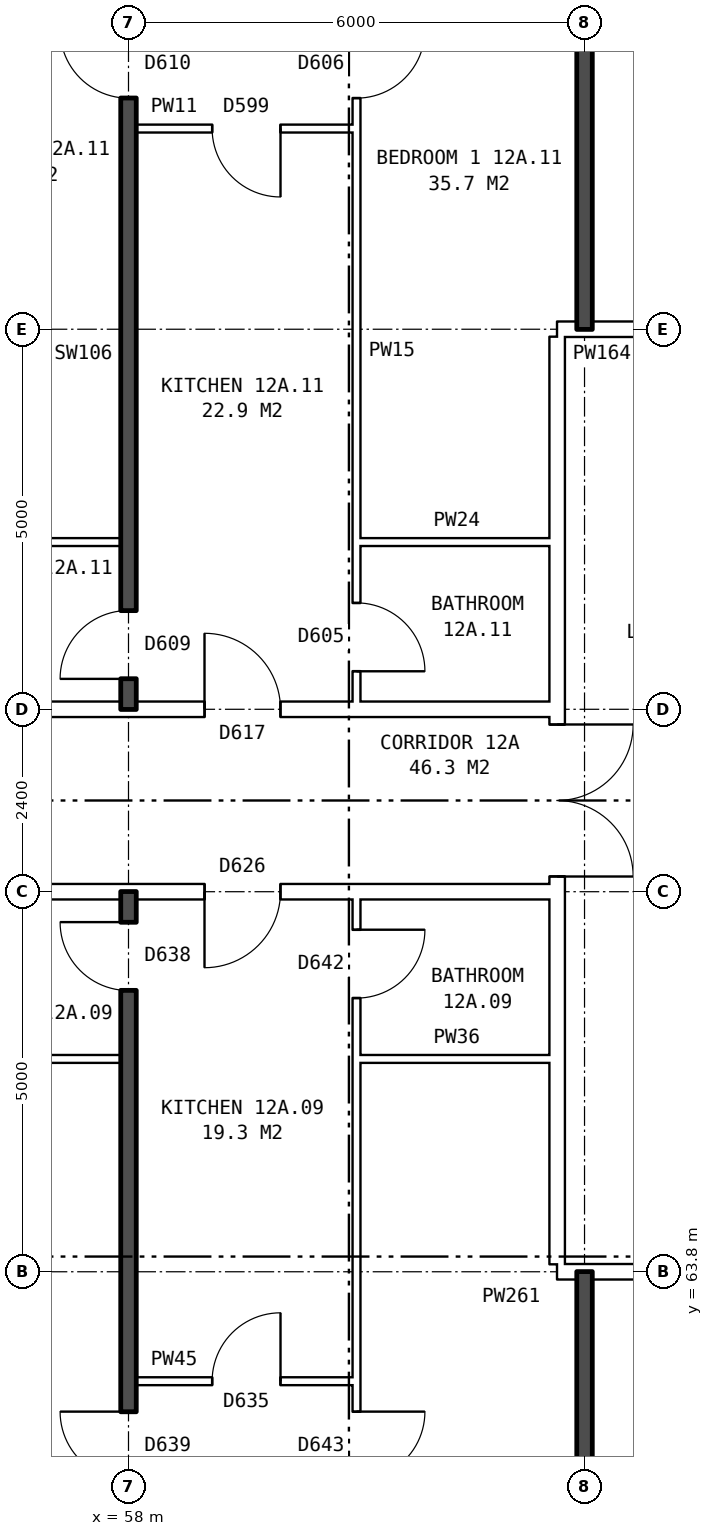
"""IFC4 building model, lengths in metres.
Left out: names, types, materials, properties, quantities, classifications, styles, units other than length and angle.
Written with IfcOpenShell. Run it as: python <this file> out.ifc"""

import sys

from ifc_helpers import new_model, si_unit, direction, frame, frame_2d, origin, place, context, subcontext, project, spatial, rectangle, extrude, element, fill, save


model = new_model("IFC4")
c1 = context("Model", 3, precision=1e-05, world=origin(), true_north=direction((0.0, 1.0)))
c2 = subcontext(c1, "Body", "Model", "MODEL_VIEW")
j1 = project(units=[si_unit("LENGTHUNIT", "METRE"), si_unit("PLANEANGLEUNIT", "RADIAN")], contexts=[c1])
p1 = place(None, origin())
s1 = spatial("IfcSite", under=j1, at=p1, CompositionType="ELEMENT")
p2 = place(p1, origin())
s2 = spatial("IfcBuilding", under=s1, at=p2, CompositionType="ELEMENT")
p3 = place(p2, frame((0.0, 0.0, 47.4)))
s3 = spatial("IfcBuildingStorey", under=s2, at=p3, CompositionType="ELEMENT", Elevation=47.4)
p4 = place(p3, frame((63.64, 63.9, 0.0), z_axis=(0.0, 0.0, 1.0), x_axis=(0.0, 1.0, 0.0)))
e1 = element("IfcWall", 1, at=p4, inside=s3, PredefinedType="PARTITIONING", context=c2, shape_type="SweptSolid", body=[
    extrude(rectangle(XDim=12.2, YDim=0.2, at=frame_2d((6.1, 0.0))), origin(), (0.0, 0.0, 1.0), 2.85),
])
p5 = place(p4, frame((5.1, 0.0, 0.0)))
e2 = element("IfcOpeningElement", 2, at=p5, cuts=e1, PredefinedType="OPENING", context=c2, shape_type="SweptSolid", body=[
    extrude(rectangle(XDim=2.0, YDim=2.1, at=frame_2d((1.0, 1.05))), frame((0.0, 0.11, 0.0), z_axis=(0.0, -1.0, 0.0), x_axis=(1.0, 0.0, 0.0)), (0.0, 0.0, 1.0), 0.22),
])
p6 = place(p3, frame((58.1, 62.36, 0.0), z_axis=(0.0, 0.0, 1.0), x_axis=(1.0, 0.0, 0.0)))
e3 = element("IfcWall", 3, at=p6, inside=s3, PredefinedType="PARTITIONING", context=c2, shape_type="SweptSolid", body=[
    extrude(rectangle(XDim=2.9, YDim=0.1, at=frame_2d((1.45, 0.0))), origin(), (0.0, 0.0, 1.0), 2.85),
])
p7 = place(p6, frame((1.0, 0.0, 0.0)))
e4 = element("IfcOpeningElement", 4, at=p7, cuts=e3, PredefinedType="OPENING", context=c2, shape_type="SweptSolid", body=[
    extrude(rectangle(XDim=0.9, YDim=2.1, at=frame_2d((0.45, 1.05))), frame((0.0, 0.06, 0.0), z_axis=(0.0, -1.0, 0.0), x_axis=(1.0, 0.0, 0.0)), (0.0, 0.0, 1.0), 0.12),
])
p8 = place(p3, frame((63.64, 63.8, 0.0), z_axis=(0.0, 0.0, 1.0), x_axis=(1.0, 0.0, 0.0)))
e5 = element("IfcWall", 5, at=p8, inside=s3, PredefinedType="PARTITIONING", context=c2, shape_type="SweptSolid", body=[
    extrude(rectangle(XDim=3.0, YDim=0.2, at=frame_2d((1.5, 0.0))), origin(), (0.0, 0.0, 1.0), 2.85),
])
p9 = place(p8, frame((1.18, 0.0, 0.0)))
e6 = element("IfcOpeningElement", 6, at=p9, cuts=e5, PredefinedType="OPENING", context=c2, shape_type="SweptSolid", body=[
    extrude(rectangle(XDim=1.0, YDim=2.1, at=frame_2d((0.5, 1.05))), frame((0.0, 0.11, 0.0), z_axis=(0.0, -1.0, 0.0), x_axis=(1.0, 0.0, 0.0)), (0.0, 0.0, 1.0), 0.22),
])
p10 = place(p3, frame((52.1, 66.6, 0.0), z_axis=(0.0, 0.0, 1.0), x_axis=(1.0, 0.0, 0.0)))
e7 = element("IfcWall", 7, at=p10, inside=s3, PredefinedType="PARTITIONING", context=c2, shape_type="SweptSolid", body=[
    extrude(rectangle(XDim=5.8, YDim=0.1, at=frame_2d((2.9, 0.0))), origin(), (0.0, 0.0, 1.0), 2.85),
])
p11 = place(p3, frame((61.0, 66.6, 0.0), z_axis=(0.0, 0.0, 1.0), x_axis=(1.0, 0.0, 0.0)))
e8 = element("IfcWall", 8, at=p11, inside=s3, PredefinedType="PARTITIONING", context=c2, shape_type="SweptSolid", body=[
    extrude(rectangle(XDim=2.64, YDim=0.1, at=frame_2d((1.32, 0.0))), origin(), (0.0, 0.0, 1.0), 2.85),
])
p12 = place(p3, frame((44.36, 68.8, 0.0), z_axis=(0.0, 0.0, 1.0), x_axis=(1.0, 0.0, 0.0)))
e9 = element("IfcWall", 9, at=p12, inside=s3, PredefinedType="PARTITIONING", context=c2, shape_type="SweptSolid", body=[
    extrude(rectangle(XDim=19.28, YDim=0.2, at=frame_2d((9.64, 0.0))), origin(), (0.0, 0.0, 1.0), 2.85),
])
p13 = place(p12, frame((14.64, 0.0, 0.0)))
e10 = element("IfcOpeningElement", 10, at=p13, cuts=e9, PredefinedType="OPENING", context=c2, shape_type="SweptSolid", body=[
    extrude(rectangle(XDim=1.0, YDim=2.1, at=frame_2d((0.5, 1.05))), frame((0.0, 0.11, 0.0), z_axis=(0.0, -1.0, 0.0), x_axis=(1.0, 0.0, 0.0)), (0.0, 0.0, 1.0), 0.22),
])
p14 = place(p12, frame((5.64, 0.0, 0.0)))
e11 = element("IfcOpeningElement", 11, at=p14, cuts=e9, PredefinedType="OPENING", context=c2, shape_type="SweptSolid", body=[
    extrude(rectangle(XDim=1.0, YDim=2.1, at=frame_2d((0.5, 1.05))), frame((0.0, 0.11, 0.0), z_axis=(0.0, -1.0, 0.0), x_axis=(1.0, 0.0, 0.0)), (0.0, 0.0, 1.0), 0.22),
])
p15 = place(p3, frame((44.36, 71.2, 0.0), z_axis=(0.0, 0.0, 1.0), x_axis=(1.0, 0.0, 0.0)))
e12 = element("IfcWall", 12, at=p15, inside=s3, PredefinedType="PARTITIONING", context=c2, shape_type="SweptSolid", body=[
    extrude(rectangle(XDim=19.28, YDim=0.2, at=frame_2d((9.64, 0.0))), origin(), (0.0, 0.0, 1.0), 2.85),
])
p16 = place(p15, frame((14.64, 0.0, 0.0)))
e13 = element("IfcOpeningElement", 13, at=p16, cuts=e12, PredefinedType="OPENING", context=c2, shape_type="SweptSolid", body=[
    extrude(rectangle(XDim=1.0, YDim=2.1, at=frame_2d((0.5, 1.05))), frame((0.0, 0.11, 0.0), z_axis=(0.0, -1.0, 0.0), x_axis=(1.0, 0.0, 0.0)), (0.0, 0.0, 1.0), 0.22),
])
p17 = place(p15, frame((5.64, 0.0, 0.0)))
e14 = element("IfcOpeningElement", 14, at=p17, cuts=e12, PredefinedType="OPENING", context=c2, shape_type="SweptSolid", body=[
    extrude(rectangle(XDim=1.0, YDim=2.1, at=frame_2d((0.5, 1.05))), frame((0.0, 0.11, 0.0), z_axis=(0.0, -1.0, 0.0), x_axis=(1.0, 0.0, 0.0)), (0.0, 0.0, 1.0), 0.22),
])
p18 = place(p3, frame((52.1, 73.4, 0.0), z_axis=(0.0, 0.0, 1.0), x_axis=(1.0, 0.0, 0.0)))
e15 = element("IfcWall", 15, at=p18, inside=s3, PredefinedType="PARTITIONING", context=c2, shape_type="SweptSolid", body=[
    extrude(rectangle(XDim=5.8, YDim=0.1, at=frame_2d((2.9, 0.0))), origin(), (0.0, 0.0, 1.0), 2.85),
])
p19 = place(p3, frame((61.0, 73.4, 0.0), z_axis=(0.0, 0.0, 1.0), x_axis=(1.0, 0.0, 0.0)))
e16 = element("IfcWall", 16, at=p19, inside=s3, PredefinedType="PARTITIONING", context=c2, shape_type="SweptSolid", body=[
    extrude(rectangle(XDim=2.64, YDim=0.1, at=frame_2d((1.32, 0.0))), origin(), (0.0, 0.0, 1.0), 2.85),
])
p20 = place(p3, frame((63.64, 76.2, 0.0), z_axis=(0.0, 0.0, 1.0), x_axis=(1.0, 0.0, 0.0)))
e17 = element("IfcWall", 17, at=p20, inside=s3, PredefinedType="PARTITIONING", context=c2, shape_type="SweptSolid", body=[
    extrude(rectangle(XDim=3.0, YDim=0.2, at=frame_2d((1.5, 0.0))), origin(), (0.0, 0.0, 1.0), 2.85),
])
p21 = place(p20, frame((1.18, 0.0, 0.0)))
e18 = element("IfcOpeningElement", 18, at=p21, cuts=e17, PredefinedType="OPENING", context=c2, shape_type="SweptSolid", body=[
    extrude(rectangle(XDim=1.0, YDim=2.1, at=frame_2d((0.5, 1.05))), frame((0.0, 0.11, 0.0), z_axis=(0.0, -1.0, 0.0), x_axis=(1.0, 0.0, 0.0)), (0.0, 0.0, 1.0), 0.22),
])
p22 = place(p3, frame((58.1, 78.84, 0.0), z_axis=(0.0, 0.0, 1.0), x_axis=(1.0, 0.0, 0.0)))
e19 = element("IfcWall", 19, at=p22, inside=s3, PredefinedType="PARTITIONING", context=c2, shape_type="SweptSolid", body=[
    extrude(rectangle(XDim=2.9, YDim=0.1, at=frame_2d((1.45, 0.0))), origin(), (0.0, 0.0, 1.0), 2.85),
])
p23 = place(p22, frame((1.0, 0.0, 0.0)))
e20 = element("IfcOpeningElement", 20, at=p23, cuts=e19, PredefinedType="OPENING", context=c2, shape_type="SweptSolid", body=[
    extrude(rectangle(XDim=0.9, YDim=2.1, at=frame_2d((0.45, 1.05))), frame((0.0, 0.06, 0.0), z_axis=(0.0, -1.0, 0.0), x_axis=(1.0, 0.0, 0.0)), (0.0, 0.0, 1.0), 0.12),
])
p24 = place(p3, frame((58.0, 54.36, 0.0), z_axis=(0.0, 0.0, 1.0), x_axis=(0.0, 1.0, 0.0)))
e21 = element("IfcWall", 21, at=p24, inside=s3, PredefinedType="SOLIDWALL", context=c2, shape_type="SweptSolid", body=[
    extrude(rectangle(XDim=14.44, YDim=0.2, at=frame_2d((7.22, 0.0))), origin(), (0.0, 0.0, 1.0), 2.85),
])
p25 = place(p24, frame((6.7, 0.0, 0.0)))
e22 = element("IfcOpeningElement", 22, at=p25, cuts=e21, PredefinedType="OPENING", context=c2, shape_type="SweptSolid", body=[
    extrude(rectangle(XDim=0.9, YDim=2.1, at=frame_2d((0.45, 1.05))), frame((0.0, 0.11, 0.0), z_axis=(0.0, -1.0, 0.0), x_axis=(1.0, 0.0, 0.0)), (0.0, 0.0, 1.0), 0.22),
])
p26 = place(p24, frame((13.14, 0.0, 0.0)))
e23 = element("IfcOpeningElement", 23, at=p26, cuts=e21, PredefinedType="OPENING", context=c2, shape_type="SweptSolid", body=[
    extrude(rectangle(XDim=0.9, YDim=2.1, at=frame_2d((0.45, 1.05))), frame((0.0, 0.11, 0.0), z_axis=(0.0, -1.0, 0.0), x_axis=(1.0, 0.0, 0.0)), (0.0, 0.0, 1.0), 0.22),
])
p27 = place(p3, frame((58.0, 71.2, 0.0), z_axis=(0.0, 0.0, 1.0), x_axis=(0.0, 1.0, 0.0)))
e24 = element("IfcWall", 24, at=p27, inside=s3, PredefinedType="SOLIDWALL", context=c2, shape_type="SweptSolid", body=[
    extrude(rectangle(XDim=14.44, YDim=0.2, at=frame_2d((7.22, 0.0))), origin(), (0.0, 0.0, 1.0), 2.85),
])
p28 = place(p27, frame((8.04, 0.0, 0.0)))
e25 = element("IfcOpeningElement", 25, at=p28, cuts=e24, PredefinedType="OPENING", context=c2, shape_type="SweptSolid", body=[
    extrude(rectangle(XDim=0.9, YDim=2.1, at=frame_2d((0.45, 1.05))), frame((0.0, 0.11, 0.0), z_axis=(0.0, -1.0, 0.0), x_axis=(1.0, 0.0, 0.0)), (0.0, 0.0, 1.0), 0.22),
])
p29 = place(p27, frame((0.4, 0.0, 0.0)))
e26 = element("IfcOpeningElement", 26, at=p29, cuts=e24, PredefinedType="OPENING", context=c2, shape_type="SweptSolid", body=[
    extrude(rectangle(XDim=0.9, YDim=2.1, at=frame_2d((0.45, 1.05))), frame((0.0, 0.11, 0.0), z_axis=(0.0, -1.0, 0.0), x_axis=(1.0, 0.0, 0.0)), (0.0, 0.0, 1.0), 0.22),
])
p30 = place(p3, frame((61.0, 54.36, 0.0), z_axis=(0.0, 0.0, 1.0), x_axis=(0.0, 1.0, 0.0)))
e27 = element("IfcWall", 27, at=p30, inside=s3, PredefinedType="PARTITIONING", context=c2, shape_type="SweptSolid", body=[
    extrude(rectangle(XDim=14.34, YDim=0.1, at=frame_2d((7.17, 0.0))), origin(), (0.0, 0.0, 1.0), 2.85),
])
p31 = place(p30, frame((6.7, 0.0, 0.0)))
e28 = element("IfcOpeningElement", 28, at=p31, cuts=e27, PredefinedType="OPENING", context=c2, shape_type="SweptSolid", body=[
    extrude(rectangle(XDim=0.9, YDim=2.1, at=frame_2d((0.45, 1.05))), frame((0.0, 0.06, 0.0), z_axis=(0.0, -1.0, 0.0), x_axis=(1.0, 0.0, 0.0)), (0.0, 0.0, 1.0), 0.12),
])
p32 = place(p30, frame((13.04, 0.0, 0.0)))
e29 = element("IfcOpeningElement", 29, at=p32, cuts=e27, PredefinedType="OPENING", context=c2, shape_type="SweptSolid", body=[
    extrude(rectangle(XDim=0.9, YDim=2.1, at=frame_2d((0.45, 1.05))), frame((0.0, 0.06, 0.0), z_axis=(0.0, -1.0, 0.0), x_axis=(1.0, 0.0, 0.0)), (0.0, 0.0, 1.0), 0.12),
])
p33 = place(p3, frame((61.0, 71.3, 0.0), z_axis=(0.0, 0.0, 1.0), x_axis=(0.0, 1.0, 0.0)))
e30 = element("IfcWall", 30, at=p33, inside=s3, PredefinedType="PARTITIONING", context=c2, shape_type="SweptSolid", body=[
    extrude(rectangle(XDim=14.34, YDim=0.1, at=frame_2d((7.17, 0.0))), origin(), (0.0, 0.0, 1.0), 2.85),
])
p34 = place(p33, frame((7.94, 0.0, 0.0)))
e31 = element("IfcOpeningElement", 31, at=p34, cuts=e30, PredefinedType="OPENING", context=c2, shape_type="SweptSolid", body=[
    extrude(rectangle(XDim=0.9, YDim=2.1, at=frame_2d((0.45, 1.05))), frame((0.0, 0.06, 0.0), z_axis=(0.0, -1.0, 0.0), x_axis=(1.0, 0.0, 0.0)), (0.0, 0.0, 1.0), 0.12),
])
p35 = place(p33, frame((0.4, 0.0, 0.0)))
e32 = element("IfcOpeningElement", 32, at=p35, cuts=e30, PredefinedType="OPENING", context=c2, shape_type="SweptSolid", body=[
    extrude(rectangle(XDim=0.9, YDim=2.1, at=frame_2d((0.45, 1.05))), frame((0.0, 0.06, 0.0), z_axis=(0.0, -1.0, 0.0), x_axis=(1.0, 0.0, 0.0)), (0.0, 0.0, 1.0), 0.12),
])
for number, where, z_axis, x_axis in (
    (33, (64.0, 54.36, 0.0), (0.0, 0.0, 1.0), (0.0, 1.0, 0.0)),
    (34, (64.0, 76.2, 0.0), (0.0, 0.0, 1.0), (0.0, 1.0, 0.0)),
):
    element("IfcWall", number, at=place(p3, frame(where, z_axis=z_axis, x_axis=x_axis)), inside=s3, PredefinedType="SOLIDWALL", context=c2, shape_type="SweptSolid", body=[
        extrude(rectangle(XDim=9.44, YDim=0.2, at=frame_2d((4.72, 0.0))), origin(), (0.0, 0.0, 1.0), 2.85),
    ])
p36 = place(p5, frame((2.0, 0.0, 0.0), z_axis=(0.0, 0.0, 1.0), x_axis=(-1.0, 0.0, 0.0)))
e35 = element("IfcDoor", 35, at=p36, inside=s3, OperationType="DOUBLE_DOOR_SINGLE_SWING", PredefinedType="DOOR", context=c2, shape_type="SweptSolid", body=[
    extrude(rectangle(XDim=2.0, YDim=2.1, at=frame_2d((1.0, 1.05))), frame((0.0, 0.025, 0.0), z_axis=(0.0, -1.0, 0.0), x_axis=(1.0, 0.0, 0.0)), (0.0, 0.0, 1.0), 0.05),
])
fill(e2, e35)
p37 = place(p31, frame((0.9, 0.0, 0.0), z_axis=(0.0, 0.0, 1.0), x_axis=(-1.0, 0.0, 0.0)))
e36 = element("IfcDoor", 36, at=p37, inside=s3, OperationType="SINGLE_SWING_LEFT", PredefinedType="DOOR", context=c2, shape_type="SweptSolid", body=[
    extrude(rectangle(XDim=0.9, YDim=2.1, at=frame_2d((0.45, 1.05))), frame((0.0, 0.025, 0.0), z_axis=(0.0, -1.0, 0.0), x_axis=(1.0, 0.0, 0.0)), (0.0, 0.0, 1.0), 0.05),
])
fill(e28, e36)
p38 = place(p25, origin())
e37 = element("IfcDoor", 37, at=p38, inside=s3, OperationType="SINGLE_SWING_RIGHT", PredefinedType="DOOR", context=c2, shape_type="SweptSolid", body=[
    extrude(rectangle(XDim=0.9, YDim=2.1, at=frame_2d((0.45, 1.05))), frame((0.0, 0.025, 0.0), z_axis=(0.0, -1.0, 0.0), x_axis=(1.0, 0.0, 0.0)), (0.0, 0.0, 1.0), 0.05),
])
fill(e22, e37)
p39 = place(p13, frame((1.0, 0.0, 0.0), z_axis=(0.0, 0.0, 1.0), x_axis=(-1.0, 0.0, 0.0)))
e38 = element("IfcDoor", 38, at=p39, inside=s3, OperationType="SINGLE_SWING_RIGHT", PredefinedType="DOOR", context=c2, shape_type="SweptSolid", body=[
    extrude(rectangle(XDim=1.0, YDim=2.1, at=frame_2d((0.5, 1.05))), frame((0.0, 0.025, 0.0), z_axis=(0.0, -1.0, 0.0), x_axis=(1.0, 0.0, 0.0)), (0.0, 0.0, 1.0), 0.05),
])
fill(e10, e38)
p40 = place(p7, origin())
e39 = element("IfcDoor", 39, at=p40, inside=s3, OperationType="SINGLE_SWING_RIGHT", PredefinedType="DOOR", context=c2, shape_type="SweptSolid", body=[
    extrude(rectangle(XDim=0.9, YDim=2.1, at=frame_2d((0.45, 1.05))), frame((0.0, 0.025, 0.0), z_axis=(0.0, -1.0, 0.0), x_axis=(1.0, 0.0, 0.0)), (0.0, 0.0, 1.0), 0.05),
])
fill(e4, e39)
p41 = place(p32, frame((0.9, 0.0, 0.0), z_axis=(0.0, 0.0, 1.0), x_axis=(-1.0, 0.0, 0.0)))
e40 = element("IfcDoor", 40, at=p41, inside=s3, OperationType="SINGLE_SWING_LEFT", PredefinedType="DOOR", context=c2, shape_type="SweptSolid", body=[
    extrude(rectangle(XDim=0.9, YDim=2.1, at=frame_2d((0.45, 1.05))), frame((0.0, 0.025, 0.0), z_axis=(0.0, -1.0, 0.0), x_axis=(1.0, 0.0, 0.0)), (0.0, 0.0, 1.0), 0.05),
])
fill(e29, e40)
p42 = place(p26, origin())
e41 = element("IfcDoor", 41, at=p42, inside=s3, OperationType="SINGLE_SWING_RIGHT", PredefinedType="DOOR", context=c2, shape_type="SweptSolid", body=[
    extrude(rectangle(XDim=0.9, YDim=2.1, at=frame_2d((0.45, 1.05))), frame((0.0, 0.025, 0.0), z_axis=(0.0, -1.0, 0.0), x_axis=(1.0, 0.0, 0.0)), (0.0, 0.0, 1.0), 0.05),
])
fill(e23, e41)
p43 = place(p34, frame((0.9, 0.0, 0.0), z_axis=(0.0, 0.0, 1.0), x_axis=(-1.0, 0.0, 0.0)))
e42 = element("IfcDoor", 42, at=p43, inside=s3, OperationType="SINGLE_SWING_LEFT", PredefinedType="DOOR", context=c2, shape_type="SweptSolid", body=[
    extrude(rectangle(XDim=0.9, YDim=2.1, at=frame_2d((0.45, 1.05))), frame((0.0, 0.025, 0.0), z_axis=(0.0, -1.0, 0.0), x_axis=(1.0, 0.0, 0.0)), (0.0, 0.0, 1.0), 0.05),
])
fill(e31, e42)
p44 = place(p28, origin())
e43 = element("IfcDoor", 43, at=p44, inside=s3, OperationType="SINGLE_SWING_RIGHT", PredefinedType="DOOR", context=c2, shape_type="SweptSolid", body=[
    extrude(rectangle(XDim=0.9, YDim=2.1, at=frame_2d((0.45, 1.05))), frame((0.0, 0.025, 0.0), z_axis=(0.0, -1.0, 0.0), x_axis=(1.0, 0.0, 0.0)), (0.0, 0.0, 1.0), 0.05),
])
fill(e25, e43)
p45 = place(p16, origin())
e44 = element("IfcDoor", 44, at=p45, inside=s3, OperationType="SINGLE_SWING_LEFT", PredefinedType="DOOR", context=c2, shape_type="SweptSolid", body=[
    extrude(rectangle(XDim=1.0, YDim=2.1, at=frame_2d((0.5, 1.05))), frame((0.0, 0.025, 0.0), z_axis=(0.0, -1.0, 0.0), x_axis=(1.0, 0.0, 0.0)), (0.0, 0.0, 1.0), 0.05),
])
fill(e13, e44)
p46 = place(p23, frame((0.9, 0.0, 0.0), z_axis=(0.0, 0.0, 1.0), x_axis=(-1.0, 0.0, 0.0)))
e45 = element("IfcDoor", 45, at=p46, inside=s3, OperationType="SINGLE_SWING_LEFT", PredefinedType="DOOR", context=c2, shape_type="SweptSolid", body=[
    extrude(rectangle(XDim=0.9, YDim=2.1, at=frame_2d((0.45, 1.05))), frame((0.0, 0.025, 0.0), z_axis=(0.0, -1.0, 0.0), x_axis=(1.0, 0.0, 0.0)), (0.0, 0.0, 1.0), 0.05),
])
fill(e20, e45)
p47 = place(p35, frame((0.9, 0.0, 0.0), z_axis=(0.0, 0.0, 1.0), x_axis=(-1.0, 0.0, 0.0)))
e46 = element("IfcDoor", 46, at=p47, inside=s3, OperationType="SINGLE_SWING_RIGHT", PredefinedType="DOOR", context=c2, shape_type="SweptSolid", body=[
    extrude(rectangle(XDim=0.9, YDim=2.1, at=frame_2d((0.45, 1.05))), frame((0.0, 0.025, 0.0), z_axis=(0.0, -1.0, 0.0), x_axis=(1.0, 0.0, 0.0)), (0.0, 0.0, 1.0), 0.05),
])
fill(e32, e46)
p48 = place(p29, origin())
e47 = element("IfcDoor", 47, at=p48, inside=s3, OperationType="SINGLE_SWING_LEFT", PredefinedType="DOOR", context=c2, shape_type="SweptSolid", body=[
    extrude(rectangle(XDim=0.9, YDim=2.1, at=frame_2d((0.45, 1.05))), frame((0.0, 0.025, 0.0), z_axis=(0.0, -1.0, 0.0), x_axis=(1.0, 0.0, 0.0)), (0.0, 0.0, 1.0), 0.05),
])
fill(e26, e47)
save(model, sys.argv[1])
